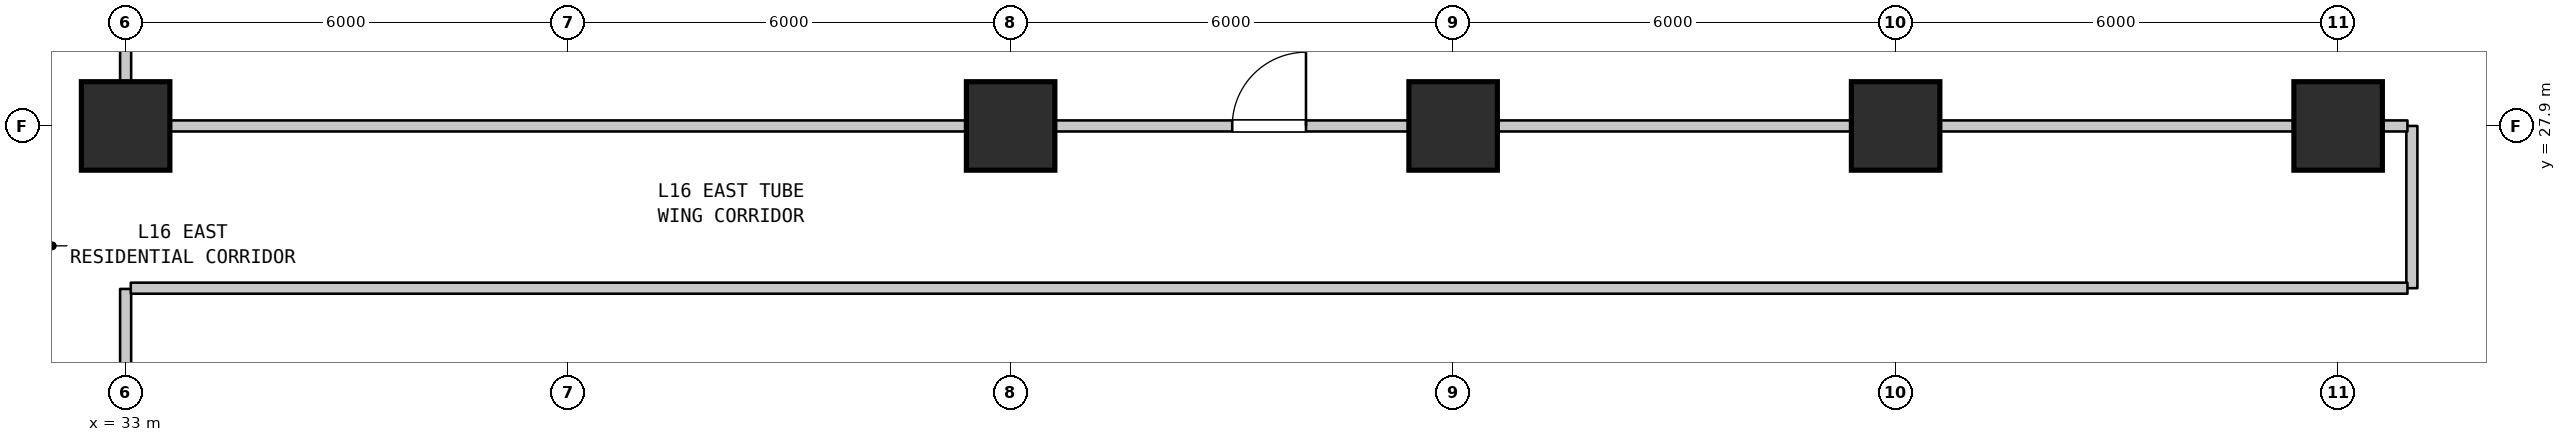
"""IFC4 building model, lengths in metres.
Left out: names, types, materials, properties, quantities, classifications, styles, units other than length and angle.
Written with IfcOpenShell. Run it as: python <this file> out.ifc"""

import sys

from ifc_helpers import new_model, si_unit, direction, frame, frame_2d, origin, origin_2d, place, context, subcontext, project, spatial, rectangle, extrude, element, fill, save


model = new_model("IFC4")
c1 = context("Model", 3, precision=1e-05, world=origin(), true_north=direction((0.0, 1.0)))
c2 = subcontext(c1, "Body", "Model", "MODEL_VIEW")
j1 = project(units=[si_unit("LENGTHUNIT", "METRE"), si_unit("PLANEANGLEUNIT", "RADIAN")], contexts=[c1])
p1 = place(None, origin())
s1 = spatial("IfcSite", under=j1, at=p1, CompositionType="ELEMENT")
p2 = place(p1, origin())
s2 = spatial("IfcBuilding", under=s1, at=p2, CompositionType="ELEMENT")
p3 = place(p2, frame((0.0, 0.0, 70.1)))
s3 = spatial("IfcBuildingStorey", under=s2, at=p3, CompositionType="ELEMENT", Elevation=70.1)
for number, where, z_axis, x_axis in (
    (1, (33.0, 27.9, 0.0), (0.0, 0.0, 1.0), (1.0, 0.0, 0.0)),
    (2, (45.0, 27.9, 0.0), (0.0, 0.0, 1.0), (1.0, 0.0, 0.0)),
    (3, (51.0, 27.9, 0.0), (0.0, 0.0, 1.0), (1.0, 0.0, 0.0)),
    (4, (57.0, 27.9, 0.0), (0.0, 0.0, 1.0), (1.0, 0.0, 0.0)),
    (5, (63.0, 27.9, 0.0), (0.0, 0.0, 1.0), (1.0, 0.0, 0.0)),
):
    element("IfcColumn", number, at=place(p3, frame(where, z_axis=z_axis, x_axis=x_axis)), inside=s3, PredefinedType="COLUMN", context=c2, shape_type="SweptSolid", body=[
        extrude(rectangle(XDim=1.2, YDim=1.2, at=origin_2d()), origin(), (0.0, 0.0, 1.0), 3.7),
    ])
p4 = place(p3, frame((33.0, 19.51, 0.0), z_axis=(0.0, 0.0, 1.0), x_axis=(0.0, 1.0, 0.0)))
e6 = element("IfcWall", 6, at=p4, inside=s3, PredefinedType="STANDARD", context=c2, shape_type="SweptSolid", body=[
    extrude(rectangle(XDim=6.18, YDim=0.15, at=frame_2d((3.09, 0.0))), origin(), (0.0, 0.0, 1.0), 2.885),
])
p5 = place(p3, frame((33.0, 27.91, 0.0), z_axis=(0.0, 0.0, 1.0), x_axis=(0.0, 1.0, 0.0)))
e7 = element("IfcWall", 7, at=p5, inside=s3, PredefinedType="STANDARD", context=c2, shape_type="SweptSolid", body=[
    extrude(rectangle(XDim=9.98, YDim=0.15, at=frame_2d((4.99, 0.0))), origin(), (0.0, 0.0, 1.0), 2.885),
])
p6 = place(p3, frame((64.0, 25.7, 0.0), z_axis=(0.0, 0.0, 1.0), x_axis=(0.0, 1.0, 0.0)))
e8 = element("IfcWall", 8, at=p6, inside=s3, PredefinedType="STANDARD", context=c2, shape_type="SweptSolid", body=[
    extrude(rectangle(XDim=2.2, YDim=0.15, at=frame_2d((1.1, 0.0))), origin(), (0.0, 0.0, 1.0), 3.385),
])
p7 = place(p3, frame((33.07, 25.7, 0.0), z_axis=(0.0, 0.0, 1.0), x_axis=(1.0, 0.0, 0.0)))
e9 = element("IfcWall", 9, at=p7, inside=s3, PredefinedType="STANDARD", context=c2, shape_type="SweptSolid", body=[
    extrude(rectangle(XDim=30.87, YDim=0.15, at=frame_2d((15.435, 0.0))), origin(), (0.0, 0.0, 1.0), 3.385),
])
p8 = place(p3, frame((33.07, 27.9, 0.0), z_axis=(0.0, 0.0, 1.0), x_axis=(1.0, 0.0, 0.0)))
e10 = element("IfcWall", 10, at=p8, inside=s3, PredefinedType="STANDARD", context=c2, shape_type="SweptSolid", body=[
    extrude(rectangle(XDim=30.87, YDim=0.15, at=frame_2d((15.435, 0.0))), origin(), (0.0, 0.0, 1.0), 2.885),
])
p9 = place(p8, frame((14.935, 0.0, 0.0)))
e11 = element("IfcOpeningElement", 11, at=p9, cuts=e10, PredefinedType="OPENING", context=c2, shape_type="SweptSolid", body=[
    extrude(rectangle(XDim=1.0, YDim=2.15, at=frame_2d((0.5, 1.075))), frame((0.0, 0.085, 0.0), z_axis=(0.0, -1.0, 0.0), x_axis=(1.0, 0.0, 0.0)), (0.0, 0.0, 1.0), 0.17),
])
p10 = place(p9, origin())
e12 = element("IfcDoor", 12, at=p10, inside=s3, OperationType="SINGLE_SWING_RIGHT", PredefinedType="DOOR", context=c2, shape_type="SweptSolid", body=[
    extrude(rectangle(XDim=1.0, YDim=2.15, at=frame_2d((0.5, 1.075))), frame((0.0, 0.025, 0.0), z_axis=(0.0, -1.0, 0.0), x_axis=(1.0, 0.0, 0.0)), (0.0, 0.0, 1.0), 0.05),
])
fill(e11, e12)
save(model, sys.argv[1])
